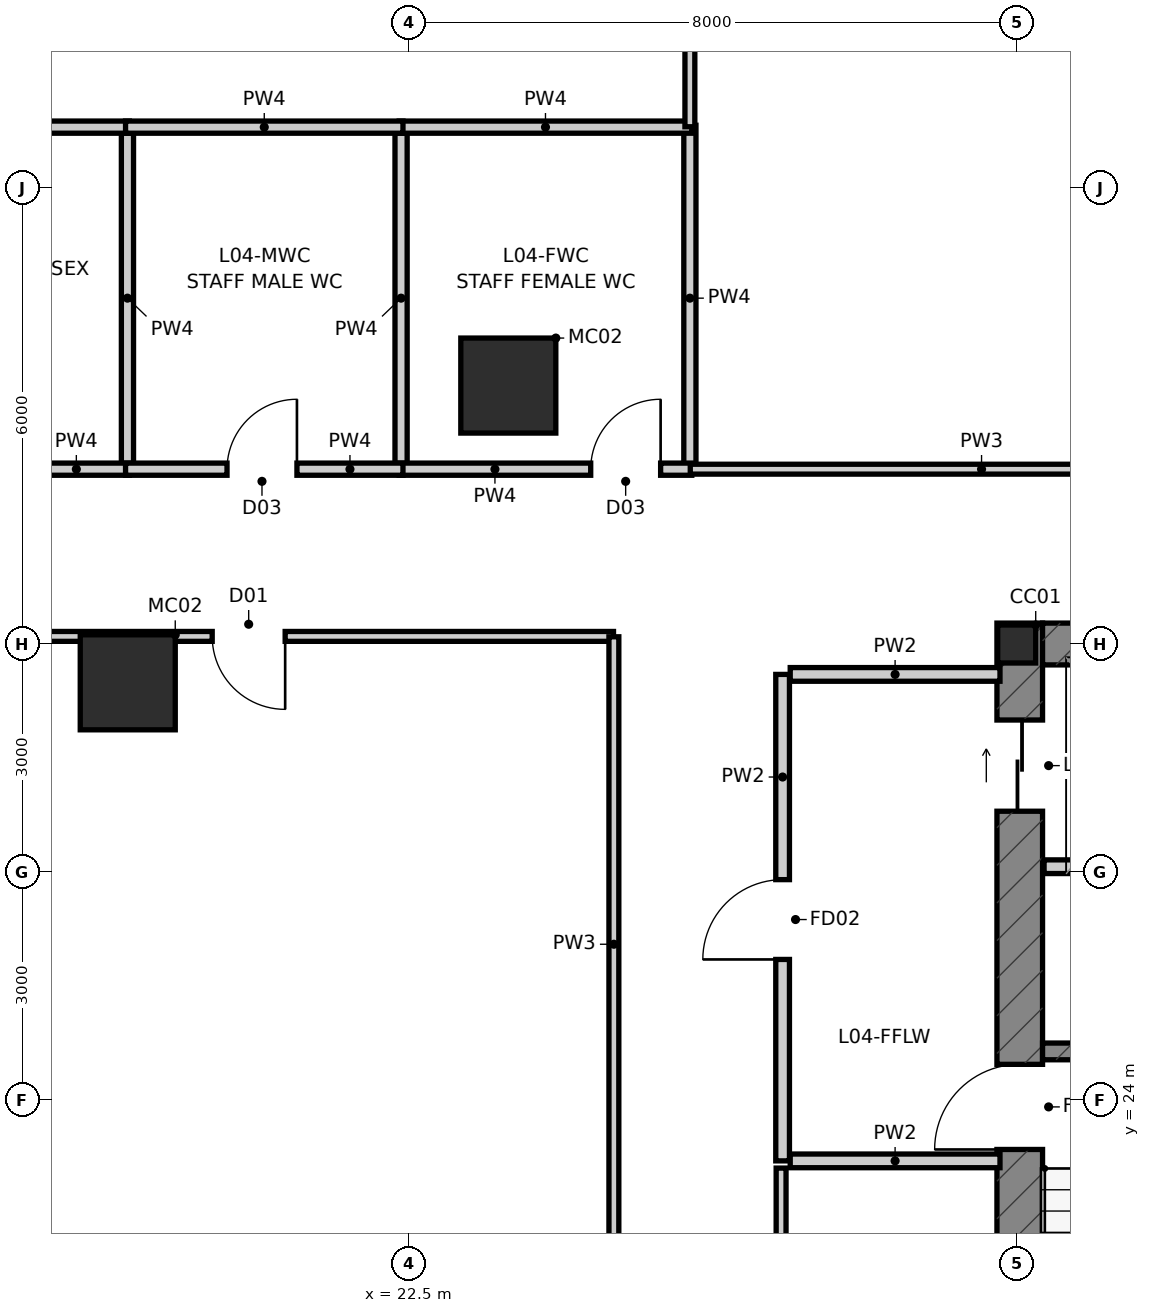
"""IFC4 building model, lengths in metres.
Left out: names, types, materials, properties, quantities, classifications, styles, units other than length and angle.
Written with IfcOpenShell. Run it as: python <this file> out.ifc"""

import sys

from ifc_helpers import new_model, si_unit, direction, frame, frame_2d, origin, origin_2d, place, context, subcontext, project, spatial, rectangle, hollow_rectangle, i_section, extrude, source, transform, mapped, element, fill, save


model = new_model("IFC4")
c1 = context("Model", 3, precision=1e-05, world=origin(), true_north=direction((0.0, 1.0)))
c2 = subcontext(c1, "Body", "Model", "MODEL_VIEW")
j1 = project(units=[si_unit("LENGTHUNIT", "METRE"), si_unit("PLANEANGLEUNIT", "RADIAN")], contexts=[c1])
p1 = place(None, origin())
s1 = spatial("IfcSite", under=j1, at=p1, CompositionType="ELEMENT")
p2 = place(p1, origin())
s2 = spatial("IfcBuilding", under=s1, at=p2, CompositionType="ELEMENT")
p3 = place(p2, frame((0.0, 0.0, 18.9)))
s3 = spatial("IfcBuildingStorey", under=s2, at=p3, CompositionType="ELEMENT", Elevation=18.9)
m1 = source(origin(), c2, "Body", "SweptSolid", [
    extrude(i_section(OverallWidth=0.5, OverallDepth=0.5, WebThickness=0.028, FlangeThickness=0.04, at=origin_2d()), origin(), (0.0, 0.0, 1.0), 4.2),
])
p4 = place(p3, frame((30.5, 30.0, 0.0), z_axis=(0.0, 0.0, 1.0), x_axis=(1.0, 0.0, 0.0)))
e1 = element("IfcColumn", 1, at=p4, inside=s3, PredefinedType="COLUMN", context=c2, shape_type="MappedRepresentation", body=[
    mapped(m1, transform((0.0, 0.0, 0.0), scale=1.0)),
])
p5 = place(p3, frame((30.54, 16.85, 0.0), z_axis=(0.0, 0.0, 1.0), x_axis=(0.0, 1.0, 0.0)))
e2 = element("IfcWall", 2, at=p5, inside=s3, PredefinedType="SHEAR", context=c2, shape_type="SweptSolid", body=[
    extrude(rectangle(XDim=13.425, YDim=0.6, at=frame_2d((6.712, 0.0))), origin(), (0.0, 0.0, 1.0), 4.2),
])
p6 = place(p5, frame((6.5, 0.0, 0.0)))
e3 = element("IfcOpeningElement", 3, at=p6, cuts=e2, PredefinedType="OPENING", context=c2, shape_type="SweptSolid", body=[
    extrude(rectangle(XDim=1.12, YDim=2.15, at=frame_2d((0.56, 1.075))), frame((0.0, 0.312, 0.0), z_axis=(0.0, -1.0, 0.0), x_axis=(1.0, 0.0, 0.0)), (0.0, 0.0, 1.0), 0.624),
])
p7 = place(p5, frame((10.95, 0.0, 0.0)))
e4 = element("IfcOpeningElement", 4, at=p7, cuts=e2, PredefinedType="OPENING", context=c2, shape_type="SweptSolid", body=[
    extrude(rectangle(XDim=1.2, YDim=2.2, at=frame_2d((0.6, 1.1))), frame((0.0, 0.312, 0.0), z_axis=(0.0, -1.0, 0.0), x_axis=(1.0, 0.0, 0.0)), (0.0, 0.0, 1.0), 0.624),
])
p8 = place(p3, frame((30.84, 30.0, 0.0), z_axis=(0.0, 0.0, 1.0), x_axis=(1.0, 0.0, 0.0)))
e5 = element("IfcWall", 5, at=p8, inside=s3, PredefinedType="SHEAR", context=c2, shape_type="SweptSolid", body=[
    extrude(rectangle(XDim=2.9, YDim=0.55, at=frame_2d((1.45, 0.0))), origin(), (0.0, 0.0, 1.0), 4.2),
])
p9 = place(p3, frame((30.84, 24.64, 0.0), z_axis=(0.0, 0.0, 1.0), x_axis=(1.0, 0.0, 0.0)))
e6 = element("IfcWall", 6, at=p9, inside=s3, PredefinedType="SHEAR", context=c2, shape_type="SweptSolid", body=[
    extrude(rectangle(XDim=2.9, YDim=0.22, at=frame_2d((1.45, 0.0))), origin(), (0.0, 0.0, 1.0), 4.2),
])
m2 = source(origin(), c2, "Body", "SweptSolid", [
    extrude(hollow_rectangle(XDim=1.25, YDim=1.25, WallThickness=0.07, at=origin_2d()), origin(), (0.0, 0.0, 1.0), 4.201),
])
p10 = place(p3, frame((18.804, 29.496, 0.0), z_axis=(0.014877190058, -0.013831137632, 0.999793663136), x_axis=(0.680889907137, 0.732385782467, 0.0)))
e7 = element("IfcColumn", 7, at=p10, inside=s3, PredefinedType="COLUMN", context=c2, shape_type="MappedRepresentation", body=[
    mapped(m2, transform((0.0, 0.0, 0.0), scale=1.0)),
])
m3 = source(origin(), c2, "Body", "SweptSolid", [
    extrude(hollow_rectangle(XDim=1.25, YDim=1.25, WallThickness=0.07, at=origin_2d()), origin(), (0.0, 0.0, 1.0), 4.2),
])
p11 = place(p3, frame((23.811, 33.4, 0.0), z_axis=(0.0, 0.0, 1.0), x_axis=(1.0, 0.0, 0.0)))
e8 = element("IfcColumn", 8, at=p11, inside=s3, PredefinedType="COLUMN", context=c2, shape_type="MappedRepresentation", body=[
    mapped(m3, transform((0.0, 0.0, 0.0), scale=1.0)),
])
p12 = place(p3, frame((27.42, 23.2, 0.0), z_axis=(0.0, 0.0, 1.0), x_axis=(0.0, 1.0, 0.0)))
e9 = element("IfcWall", 9, at=p12, inside=s3, PredefinedType="PARTITIONING", context=c2, shape_type="SweptSolid", body=[
    extrude(rectangle(XDim=6.4, YDim=0.18, at=frame_2d((3.2, 0.0))), origin(), (0.0, 0.0, 1.0), 3.376),
])
p13 = place(p12, frame((2.65, 0.0, 0.0)))
e10 = element("IfcOpeningElement", 10, at=p13, cuts=e9, PredefinedType="OPENING", context=c2, shape_type="SweptSolid", body=[
    extrude(rectangle(XDim=1.05, YDim=2.15, at=frame_2d((0.525, 1.075))), frame((0.0, 0.102, 0.0), z_axis=(0.0, -1.0, 0.0), x_axis=(1.0, 0.0, 0.0)), (0.0, 0.0, 1.0), 0.204),
])
p14 = place(p3, frame((27.52, 23.2, 0.0), z_axis=(0.0, 0.0, 1.0), x_axis=(1.0, 0.0, 0.0)))
e11 = element("IfcWall", 11, at=p14, inside=s3, PredefinedType="PARTITIONING", context=c2, shape_type="SweptSolid", body=[
    extrude(rectangle(XDim=2.76, YDim=0.18, at=frame_2d((1.38, 0.0))), origin(), (0.0, 0.0, 1.0), 3.75),
])
p15 = place(p3, frame((27.52, 29.6, 0.0), z_axis=(0.0, 0.0, 1.0), x_axis=(1.0, 0.0, 0.0)))
e12 = element("IfcWall", 12, at=p15, inside=s3, PredefinedType="PARTITIONING", context=c2, shape_type="SweptSolid", body=[
    extrude(rectangle(XDim=2.76, YDim=0.18, at=frame_2d((1.38, 0.0))), origin(), (0.0, 0.0, 1.0), 3.124),
])
p16 = place(p3, frame((30.86, 27.07, 0.0), z_axis=(0.0, 0.0, 1.0), x_axis=(1.0, 0.0, 0.0)))
e13 = element("IfcWall", 13, at=p16, inside=s3, PredefinedType="PARTITIONING", context=c2, shape_type="SweptSolid", body=[
    extrude(rectangle(XDim=2.9, YDim=0.18, at=frame_2d((1.45, 0.0))), origin(), (0.0, 0.0, 1.0), 3.75),
])
for number, where, z_axis, x_axis in (
    (14, (18.8, 32.275, 0.0), (0.0, 0.0, 1.0), (0.0, 1.0, 0.0)),
    (15, (22.4, 32.275, 0.0), (0.0, 0.0, 1.0), (0.0, 1.0, 0.0)),
    (16, (26.2, 32.275, 0.0), (0.0, 0.0, 1.0), (0.0, 1.0, 0.0)),
):
    element("IfcWall", number, at=place(p3, frame(where, z_axis=z_axis, x_axis=x_axis)), inside=s3, PredefinedType="PLUMBINGWALL", context=c2, shape_type="SweptSolid", body=[
        extrude(rectangle(XDim=4.55, YDim=0.16, at=frame_2d((2.275, 0.0))), origin(), (0.0, 0.0, 1.0), 3.75),
    ])
p17 = place(p3, frame((22.375, 32.3, 0.0), z_axis=(0.0, 0.0, 1.0), x_axis=(1.0, 0.0, 0.0)))
e17 = element("IfcWall", 17, at=p17, inside=s3, PredefinedType="PLUMBINGWALL", context=c2, shape_type="SweptSolid", body=[
    extrude(rectangle(XDim=3.85, YDim=0.16, at=frame_2d((1.925, 0.0))), origin(), (0.0, 0.0, 1.0), 3.75),
])
p18 = place(p17, frame((2.52, 0.0, 0.0)))
e18 = element("IfcOpeningElement", 18, at=p18, cuts=e17, PredefinedType="OPENING", context=c2, shape_type="SweptSolid", body=[
    extrude(rectangle(XDim=0.92, YDim=2.1, at=frame_2d((0.46, 1.05))), frame((0.0, 0.092, 0.0), z_axis=(0.0, -1.0, 0.0), x_axis=(1.0, 0.0, 0.0)), (0.0, 0.0, 1.0), 0.184),
])
p19 = place(p3, frame((22.375, 36.8, 0.0), z_axis=(0.0, 0.0, 1.0), x_axis=(1.0, 0.0, 0.0)))
e19 = element("IfcWall", 19, at=p19, inside=s3, PredefinedType="PLUMBINGWALL", context=c2, shape_type="SweptSolid", body=[
    extrude(rectangle(XDim=3.85, YDim=0.16, at=frame_2d((1.925, 0.0))), origin(), (0.0, 0.0, 1.0), 3.329),
])
p20 = place(p3, frame((15.175, 32.3, 0.0), z_axis=(0.0, 0.0, 1.0), x_axis=(1.0, 0.0, 0.0)))
e20 = element("IfcWall", 20, at=p20, inside=s3, PredefinedType="PLUMBINGWALL", context=c2, shape_type="SweptSolid", body=[
    extrude(rectangle(XDim=3.65, YDim=0.16, at=frame_2d((1.825, 0.0))), origin(), (0.0, 0.0, 1.0), 3.75),
])
p21 = place(p20, frame((1.335, 0.0, 0.0)))
e21 = element("IfcOpeningElement", 21, at=p21, cuts=e20, PredefinedType="OPENING", context=c2, shape_type="SweptSolid", body=[
    extrude(rectangle(XDim=0.92, YDim=2.1, at=frame_2d((0.46, 1.05))), frame((0.0, 0.092, 0.0), z_axis=(0.0, -1.0, 0.0), x_axis=(1.0, 0.0, 0.0)), (0.0, 0.0, 1.0), 0.184),
])
p22 = place(p3, frame((15.175, 36.8, 0.0), z_axis=(0.0, 0.0, 1.0), x_axis=(1.0, 0.0, 0.0)))
e22 = element("IfcWall", 22, at=p22, inside=s3, PredefinedType="PLUMBINGWALL", context=c2, shape_type="SweptSolid", body=[
    extrude(rectangle(XDim=3.65, YDim=0.16, at=frame_2d((1.825, 0.0))), origin(), (0.0, 0.0, 1.0), 3.75),
])
p23 = place(p3, frame((18.775, 32.3, 0.0), z_axis=(0.0, 0.0, 1.0), x_axis=(1.0, 0.0, 0.0)))
e23 = element("IfcWall", 23, at=p23, inside=s3, PredefinedType="PLUMBINGWALL", context=c2, shape_type="SweptSolid", body=[
    extrude(rectangle(XDim=3.65, YDim=0.16, at=frame_2d((1.825, 0.0))), origin(), (0.0, 0.0, 1.0), 3.75),
])
p24 = place(p23, frame((1.335, 0.0, 0.0)))
e24 = element("IfcOpeningElement", 24, at=p24, cuts=e23, PredefinedType="OPENING", context=c2, shape_type="SweptSolid", body=[
    extrude(rectangle(XDim=0.92, YDim=2.1, at=frame_2d((0.46, 1.05))), frame((0.0, 0.092, 0.0), z_axis=(0.0, -1.0, 0.0), x_axis=(1.0, 0.0, 0.0)), (0.0, 0.0, 1.0), 0.184),
])
p25 = place(p3, frame((18.775, 36.8, 0.0), z_axis=(0.0, 0.0, 1.0), x_axis=(1.0, 0.0, 0.0)))
e25 = element("IfcWall", 25, at=p25, inside=s3, PredefinedType="PLUMBINGWALL", context=c2, shape_type="SweptSolid", body=[
    extrude(rectangle(XDim=3.65, YDim=0.16, at=frame_2d((1.825, 0.0))), origin(), (0.0, 0.0, 1.0), 3.75),
])
p26 = place(p3, frame((26.205, 32.3, 0.0), z_axis=(0.0, 0.0, 1.0), x_axis=(1.0, 0.0, 0.0)))
e26 = element("IfcWall", 26, at=p26, inside=s3, PredefinedType="PARTITIONING", context=c2, shape_type="SweptSolid", body=[
    extrude(rectangle(XDim=16.29, YDim=0.13, at=frame_2d((8.145, 0.0))), origin(), (0.0, 0.0, 1.0), 3.75),
])
p27 = place(p26, frame((7.665, 0.0, 0.0)))
e27 = element("IfcOpeningElement", 27, at=p27, cuts=e26, PredefinedType="OPENING", context=c2, shape_type="SweptSolid", body=[
    extrude(rectangle(XDim=0.96, YDim=2.15, at=frame_2d((0.48, 1.075))), frame((0.0, 0.077, 0.0), z_axis=(0.0, -1.0, 0.0), x_axis=(1.0, 0.0, 0.0)), (0.0, 0.0, 1.0), 0.154),
])
p28 = place(p3, frame((26.2, 36.805, 0.0), z_axis=(0.0, 0.0, 1.0), x_axis=(0.0, 1.0, 0.0)))
e28 = element("IfcWall", 28, at=p28, inside=s3, PredefinedType="PARTITIONING", context=c2, shape_type="SweptSolid", body=[
    extrude(rectangle(XDim=14.265, YDim=0.13, at=frame_2d((7.133, 0.0))), origin(), (0.0, 0.0, 1.0), 3.75),
])
p29 = place(p3, frame((25.195, 30.1, 0.0), z_axis=(0.0, 0.0, 1.0), x_axis=(-1.0, 0.0, 0.0)))
e29 = element("IfcWall", 29, at=p29, inside=s3, PredefinedType="PARTITIONING", context=c2, shape_type="SweptSolid", body=[
    extrude(rectangle(XDim=10.69, YDim=0.13, at=frame_2d((5.345, 0.0))), origin(), (0.0, 0.0, 1.0), 3.124),
])
p30 = place(p29, frame((4.32, 0.0, 0.0)))
e30 = element("IfcOpeningElement", 30, at=p30, cuts=e29, PredefinedType="OPENING", context=c2, shape_type="SweptSolid", body=[
    extrude(rectangle(XDim=0.96, YDim=2.15, at=frame_2d((0.48, 1.075))), frame((0.0, 0.077, 0.0), z_axis=(0.0, -1.0, 0.0), x_axis=(1.0, 0.0, 0.0)), (0.0, 0.0, 1.0), 0.154),
])
p31 = place(p3, frame((27.4, 14.355, 0.0), z_axis=(0.0, 0.0, 1.0), x_axis=(0.0, 1.0, 0.0)))
e31 = element("IfcWall", 31, at=p31, inside=s3, PredefinedType="PARTITIONING", context=c2, shape_type="SweptSolid", body=[
    extrude(rectangle(XDim=8.75, YDim=0.13, at=frame_2d((4.375, 0.0))), origin(), (0.0, 0.0, 1.0), 3.376),
])
p32 = place(p31, frame((3.895, 0.0, 0.0)))
e32 = element("IfcOpeningElement", 32, at=p32, cuts=e31, PredefinedType="OPENING", context=c2, shape_type="SweptSolid", body=[
    extrude(rectangle(XDim=0.96, YDim=2.15, at=frame_2d((0.48, 1.075))), frame((0.0, 0.077, 0.0), z_axis=(0.0, -1.0, 0.0), x_axis=(1.0, 0.0, 0.0)), (0.0, 0.0, 1.0), 0.154),
])
p33 = place(p3, frame((25.2, 22.005, 0.0), z_axis=(0.0, 0.0, 1.0), x_axis=(0.0, 1.0, 0.0)))
e33 = element("IfcWall", 33, at=p33, inside=s3, PredefinedType="PARTITIONING", context=c2, shape_type="SweptSolid", body=[
    extrude(rectangle(XDim=8.09, YDim=0.13, at=frame_2d((4.045, 0.0))), origin(), (0.0, 0.0, 1.0), 3.376),
])
p34 = place(p6, origin())
e34 = element("IfcDoor", 34, at=p34, inside=s3, OperationType="SINGLE_SWING_LEFT", PredefinedType="DOOR", context=c2, shape_type="SweptSolid", body=[
    extrude(rectangle(XDim=1.12, YDim=2.15, at=frame_2d((0.56, 1.075))), frame((0.0, 0.025, 0.0), z_axis=(0.0, -1.0, 0.0), x_axis=(1.0, 0.0, 0.0)), (0.0, 0.0, 1.0), 0.05),
])
fill(e3, e34)
p35 = place(p7, origin())
e35 = element("IfcDoor", 35, at=p35, inside=s3, OperationType="SLIDING_TO_LEFT", PredefinedType="DOOR", context=c2, shape_type="SweptSolid", body=[
    extrude(rectangle(XDim=1.2, YDim=2.2, at=frame_2d((0.6, 1.1))), frame((0.0, 0.025, 0.0), z_axis=(0.0, -1.0, 0.0), x_axis=(1.0, 0.0, 0.0)), (0.0, 0.0, 1.0), 0.05),
])
fill(e4, e35)
p36 = place(p13, origin())
e36 = element("IfcDoor", 36, at=p36, inside=s3, OperationType="SINGLE_SWING_LEFT", PredefinedType="DOOR", context=c2, shape_type="SweptSolid", body=[
    extrude(rectangle(XDim=1.05, YDim=2.15, at=frame_2d((0.525, 1.075))), frame((0.0, 0.025, 0.0), z_axis=(0.0, -1.0, 0.0), x_axis=(1.0, 0.0, 0.0)), (0.0, 0.0, 1.0), 0.05),
])
fill(e10, e36)
p37 = place(p18, origin())
e37 = element("IfcDoor", 37, at=p37, inside=s3, OperationType="SINGLE_SWING_RIGHT", PredefinedType="DOOR", context=c2, shape_type="SweptSolid", body=[
    extrude(rectangle(XDim=0.92, YDim=2.1, at=frame_2d((0.46, 1.05))), frame((0.0, 0.025, 0.0), z_axis=(0.0, -1.0, 0.0), x_axis=(1.0, 0.0, 0.0)), (0.0, 0.0, 1.0), 0.05),
])
fill(e18, e37)
p38 = place(p24, origin())
e38 = element("IfcDoor", 38, at=p38, inside=s3, OperationType="SINGLE_SWING_RIGHT", PredefinedType="DOOR", context=c2, shape_type="SweptSolid", body=[
    extrude(rectangle(XDim=0.92, YDim=2.1, at=frame_2d((0.46, 1.05))), frame((0.0, 0.025, 0.0), z_axis=(0.0, -1.0, 0.0), x_axis=(1.0, 0.0, 0.0)), (0.0, 0.0, 1.0), 0.05),
])
fill(e24, e38)
p39 = place(p30, origin())
e39 = element("IfcDoor", 39, at=p39, inside=s3, OperationType="SINGLE_SWING_LEFT", PredefinedType="DOOR", context=c2, shape_type="SweptSolid", body=[
    extrude(rectangle(XDim=0.96, YDim=2.15, at=frame_2d((0.48, 1.075))), frame((0.0, 0.025, 0.0), z_axis=(0.0, -1.0, 0.0), x_axis=(1.0, 0.0, 0.0)), (0.0, 0.0, 1.0), 0.05),
])
fill(e30, e39)
save(model, sys.argv[1])
